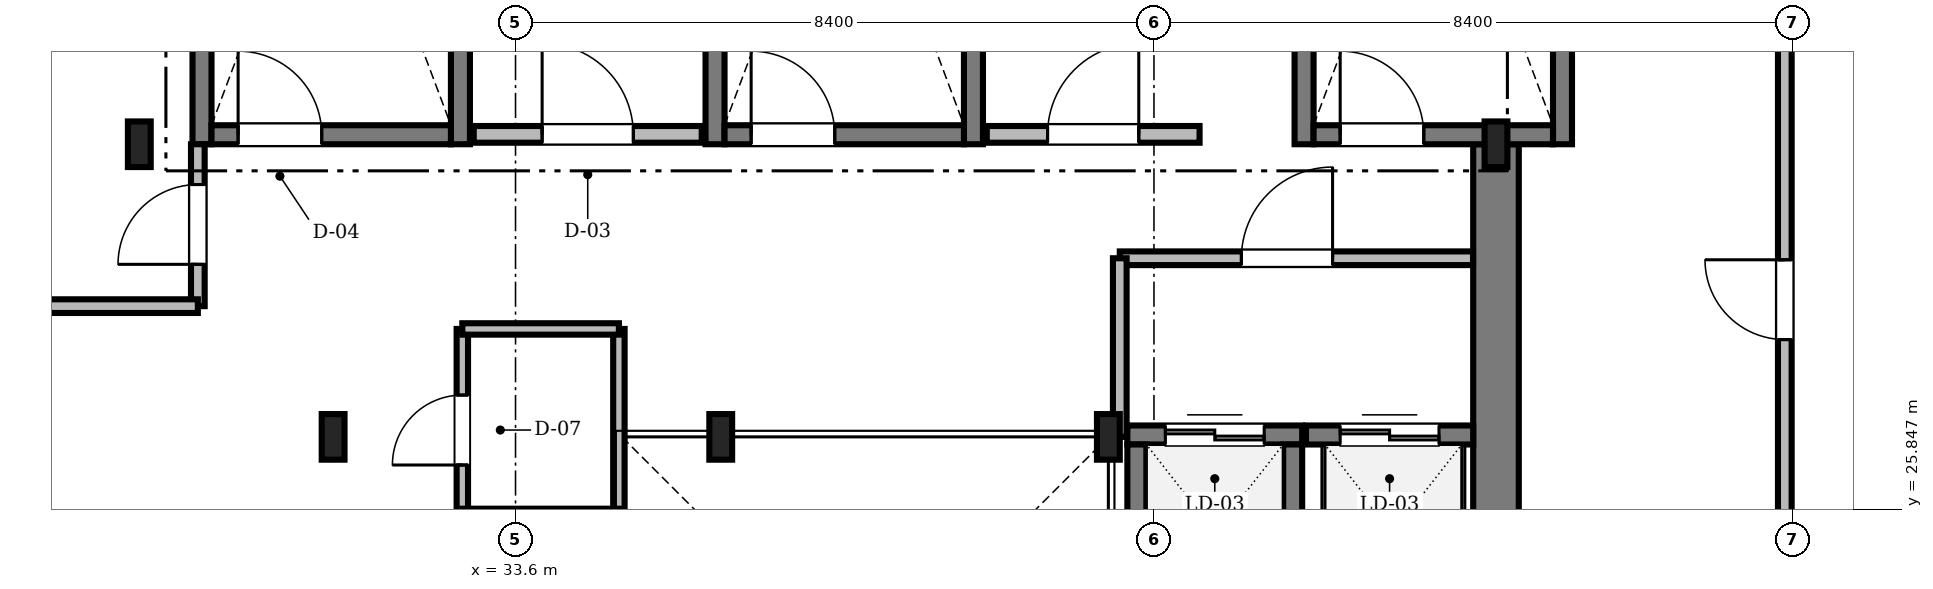
"""IFC4 building model, lengths in metres.
Left out: names, types, materials, properties, quantities, classifications, styles, units other than length and angle.
Written with IfcOpenShell. Run it as: python <this file> out.ifc"""

import sys

from ifc_helpers import new_model, si_unit, direction, frame, frame_2d, origin, origin_2d, place, context, subcontext, project, spatial, rectangle, i_section, extrude, source, transform, mapped, element, fill, save


model = new_model("IFC4")
c1 = context("Model", 3, precision=1e-05, world=origin(), true_north=direction((0.0, 1.0)))
c2 = subcontext(c1, "Body", "Model", "MODEL_VIEW")
j1 = project(units=[si_unit("LENGTHUNIT", "METRE"), si_unit("PLANEANGLEUNIT", "RADIAN")], contexts=[c1])
p1 = place(None, origin())
s1 = spatial("IfcSite", under=j1, at=p1, CompositionType="ELEMENT")
p2 = place(p1, origin())
s2 = spatial("IfcBuilding", under=s1, at=p2, CompositionType="ELEMENT")
p3 = place(p2, frame((0.0, 0.0, 291.15)))
s3 = spatial("IfcBuildingStorey", under=s2, at=p3, CompositionType="ELEMENT", Elevation=291.15)
m1 = source(origin(), c2, "Body", "SweptSolid", [
    extrude(rectangle(XDim=13.15, YDim=0.6, at=frame_2d((6.575, 0.0))), origin(), (0.0, 0.0, 1.0), 4.7),
])
p4 = place(p3, frame((46.5, 17.5, 0.0), z_axis=(0.0, 0.0, 1.0), x_axis=(0.0, 1.0, 0.0)))
e1 = element("IfcWall", 1, at=p4, inside=s3, PredefinedType="SHEAR", context=c2, shape_type="MappedRepresentation", body=[
    mapped(m1, transform((0.0, 0.0, 0.0), scale=1.0)),
])
m2 = source(origin(), c2, "Body", "SweptSolid", [
    extrude(i_section(OverallWidth=0.3, OverallDepth=0.6, WebThickness=0.015, FlangeThickness=0.03, FilletRadius=0.027, at=origin_2d()), origin(), (0.0, 0.0, 1.0), 4.7),
])
for number, where, z_axis, x_axis in (
    (2, (41.4, 26.8, 0.0), (0.0, 0.0, 1.0), (1.0, 0.0, 0.0)),
    (3, (36.3, 26.8, 0.0), (0.0, 0.0, 1.0), (1.0, 0.0, 0.0)),
    (4, (31.2, 26.8, 0.0), (0.0, 0.0, 1.0), (1.0, 0.0, 0.0)),
    (5, (28.65, 30.65, 0.0), (0.0, 0.0, 1.0), (1.0, 0.0, 0.0)),
    (6, (46.5, 30.65, 0.0), (0.0, 0.0, 1.0), (1.0, 0.0, 0.0)),
):
    element("IfcColumn", number, at=place(p3, frame(where, z_axis=z_axis, x_axis=x_axis)), inside=s3, PredefinedType="COLUMN", context=c2, shape_type="MappedRepresentation", body=[
        mapped(m2, transform((0.0, 0.0, 0.0), scale=1.0)),
    ])
m3 = source(origin(), c2, "Body", "SweptSolid", [
    extrude(rectangle(XDim=9.35, YDim=0.25, at=frame_2d((4.675, 0.0))), origin(), (0.0, 0.0, 1.0), 4.8),
])
for number, where, z_axis, x_axis in (
    (7, (29.475, 30.65, 0.0), (0.0, 0.0, 1.0), (0.0, 1.0, 0.0)),
    (8, (32.875, 30.65, 0.0), (0.0, 0.0, 1.0), (0.0, 1.0, 0.0)),
):
    element("IfcWall", number, at=place(p3, frame(where, z_axis=z_axis, x_axis=x_axis)), inside=s3, PredefinedType="SOLIDWALL", context=c2, shape_type="MappedRepresentation", body=[
        mapped(m3, transform((0.0, 0.0, 0.0), scale=1.0)),
    ])
m4 = source(origin(), c2, "Body", "SweptSolid", [
    extrude(rectangle(XDim=3.15, YDim=0.25, at=frame_2d((1.575, 0.0))), origin(), (0.0, 0.0, 1.0), 4.8),
])
p5 = place(p3, frame((29.6, 30.775, 0.0), z_axis=(0.0, 0.0, 1.0), x_axis=(1.0, 0.0, 0.0)))
e9 = element("IfcWall", 9, at=p5, inside=s3, PredefinedType="SOLIDWALL", context=c2, shape_type="MappedRepresentation", body=[
    mapped(m4, transform((0.0, 0.0, 0.0), scale=1.0)),
])
m5 = source(origin(), c2, "Body", "SweptSolid", [
    extrude(rectangle(XDim=1.1, YDim=2.2, at=frame_2d((0.55, 1.1))), frame((0.0, 0.135, 0.0), z_axis=(0.0, -1.0, 0.0), x_axis=(1.0, 0.0, 0.0)), (0.0, 0.0, 1.0), 0.27),
])
p6 = place(p5, frame((0.35, 0.0, 0.0)))
e10 = element("IfcOpeningElement", 10, at=p6, cuts=e9, PredefinedType="OPENING", context=c2, shape_type="MappedRepresentation", body=[
    mapped(m5, transform((0.0, 0.0, 0.0), scale=1.0)),
])
for number, where, z_axis, x_axis in (
    (11, (36.225, 30.65, 0.0), (0.0, 0.0, 1.0), (0.0, 1.0, 0.0)),
    (12, (39.625, 30.65, 0.0), (0.0, 0.0, 1.0), (0.0, 1.0, 0.0)),
):
    element("IfcWall", number, at=place(p3, frame(where, z_axis=z_axis, x_axis=x_axis)), inside=s3, PredefinedType="SOLIDWALL", context=c2, shape_type="MappedRepresentation", body=[
        mapped(m3, transform((0.0, 0.0, 0.0), scale=1.0)),
    ])
p7 = place(p3, frame((36.35, 30.775, 0.0), z_axis=(0.0, 0.0, 1.0), x_axis=(1.0, 0.0, 0.0)))
e13 = element("IfcWall", 13, at=p7, inside=s3, PredefinedType="SOLIDWALL", context=c2, shape_type="MappedRepresentation", body=[
    mapped(m4, transform((0.0, 0.0, 0.0), scale=1.0)),
])
p8 = place(p7, frame((0.35, 0.0, 0.0)))
e14 = element("IfcOpeningElement", 14, at=p8, cuts=e13, PredefinedType="OPENING", context=c2, shape_type="MappedRepresentation", body=[
    mapped(m5, transform((0.0, 0.0, 0.0), scale=1.0)),
])
for number, where, z_axis, x_axis in (
    (15, (43.975, 30.65, 0.0), (0.0, 0.0, 1.0), (0.0, 1.0, 0.0)),
    (16, (47.375, 30.65, 0.0), (0.0, 0.0, 1.0), (0.0, 1.0, 0.0)),
):
    element("IfcWall", number, at=place(p3, frame(where, z_axis=z_axis, x_axis=x_axis)), inside=s3, PredefinedType="SOLIDWALL", context=c2, shape_type="MappedRepresentation", body=[
        mapped(m3, transform((0.0, 0.0, 0.0), scale=1.0)),
    ])
p9 = place(p3, frame((44.1, 30.775, 0.0), z_axis=(0.0, 0.0, 1.0), x_axis=(1.0, 0.0, 0.0)))
e17 = element("IfcWall", 17, at=p9, inside=s3, PredefinedType="SOLIDWALL", context=c2, shape_type="MappedRepresentation", body=[
    mapped(m4, transform((0.0, 0.0, 0.0), scale=1.0)),
])
p10 = place(p9, frame((0.35, 0.0, 0.0)))
e18 = element("IfcOpeningElement", 18, at=p10, cuts=e17, PredefinedType="OPENING", context=c2, shape_type="MappedRepresentation", body=[
    mapped(m5, transform((0.0, 0.0, 0.0), scale=1.0)),
])
m6 = source(origin(), c2, "Body", "SweptSolid", [
    extrude(rectangle(XDim=3.0, YDim=0.22, at=frame_2d((1.5, 0.0))), origin(), (0.0, 0.0, 1.0), 4.7),
])
p11 = place(p3, frame((33.05, 30.78, 0.0), z_axis=(0.0, 0.0, 1.0), x_axis=(1.0, 0.0, 0.0)))
e19 = element("IfcWall", 19, at=p11, inside=s3, PredefinedType="SOLIDWALL", context=c2, shape_type="MappedRepresentation", body=[
    mapped(m6, transform((0.0, 0.0, 0.0), scale=1.0)),
])
m7 = source(origin(), c2, "Body", "SweptSolid", [
    extrude(rectangle(XDim=1.2, YDim=2.2, at=frame_2d((0.6, 1.1))), frame((0.0, 0.12, 0.0), z_axis=(0.0, -1.0, 0.0), x_axis=(1.0, 0.0, 0.0)), (0.0, 0.0, 1.0), 0.24),
])
p12 = place(p11, frame((0.9, 0.0, 0.0)))
e20 = element("IfcOpeningElement", 20, at=p12, cuts=e19, PredefinedType="OPENING", context=c2, shape_type="MappedRepresentation", body=[
    mapped(m7, transform((0.0, 0.0, 0.0), scale=1.0)),
])
m8 = source(origin(), c2, "Body", "SweptSolid", [
    extrude(rectangle(XDim=2.8, YDim=0.22, at=frame_2d((1.4, 0.0))), origin(), (0.0, 0.0, 1.0), 4.7),
])
p13 = place(p3, frame((39.8, 30.78, 0.0), z_axis=(0.0, 0.0, 1.0), x_axis=(1.0, 0.0, 0.0)))
e21 = element("IfcWall", 21, at=p13, inside=s3, PredefinedType="SOLIDWALL", context=c2, shape_type="MappedRepresentation", body=[
    mapped(m8, transform((0.0, 0.0, 0.0), scale=1.0)),
])
p14 = place(p13, frame((0.8, 0.0, 0.0)))
e22 = element("IfcOpeningElement", 22, at=p14, cuts=e21, PredefinedType="OPENING", context=c2, shape_type="MappedRepresentation", body=[
    mapped(m7, transform((0.0, 0.0, 0.0), scale=1.0)),
])
m9 = source(origin(), c2, "Body", "SweptSolid", [
    extrude(rectangle(XDim=2.3, YDim=0.25, at=frame_2d((1.15, 0.0))), origin(), (0.0, 0.0, 1.0), 4.7),
])
p15 = place(p3, frame((41.65, 26.825, 0.0), z_axis=(0.0, 0.0, 1.0), x_axis=(1.0, 0.0, 0.0)))
e23 = element("IfcWall", 23, at=p15, inside=s3, PredefinedType="SOLIDWALL", context=c2, shape_type="MappedRepresentation", body=[
    mapped(m9, transform((0.0, 0.0, 0.0), scale=1.0)),
])
m10 = source(origin(), c2, "Body", "SweptSolid", [
    extrude(rectangle(XDim=1.3, YDim=2.3, at=frame_2d((0.65, 1.15))), frame((0.0, 0.135, 0.0), z_axis=(0.0, -1.0, 0.0), x_axis=(1.0, 0.0, 0.0)), (0.0, 0.0, 1.0), 0.27),
])
p16 = place(p15, frame((0.5, 0.0, 0.0)))
e24 = element("IfcOpeningElement", 24, at=p16, cuts=e23, PredefinedType="OPENING", context=c2, shape_type="MappedRepresentation", body=[
    mapped(m10, transform((0.0, 0.0, 0.0), scale=1.0)),
])
for number, where, z_axis, x_axis in (
    (25, (41.775, 24.4, 0.0), (0.0, 0.0, 1.0), (0.0, 1.0, 0.0)),
    (26, (43.825, 24.4, 0.0), (0.0, 0.0, 1.0), (0.0, 1.0, 0.0)),
):
    element("IfcWall", number, at=place(p3, frame(where, z_axis=z_axis, x_axis=x_axis)), inside=s3, PredefinedType="SOLIDWALL", context=c2, shape_type="MappedRepresentation", body=[
        mapped(m9, transform((0.0, 0.0, 0.0), scale=1.0)),
    ])
m11 = source(origin(), c2, "Body", "SweptSolid", [
    extrude(rectangle(XDim=2.2, YDim=0.25, at=frame_2d((1.1, 0.0))), origin(), (0.0, 0.0, 1.0), 4.7),
])
p17 = place(p3, frame((44.0, 26.825, 0.0), z_axis=(0.0, 0.0, 1.0), x_axis=(1.0, 0.0, 0.0)))
e27 = element("IfcWall", 27, at=p17, inside=s3, PredefinedType="SOLIDWALL", context=c2, shape_type="MappedRepresentation", body=[
    mapped(m11, transform((0.0, 0.0, 0.0), scale=1.0)),
])
p18 = place(p17, frame((0.45, 0.0, 0.0)))
e28 = element("IfcOpeningElement", 28, at=p18, cuts=e27, PredefinedType="OPENING", context=c2, shape_type="MappedRepresentation", body=[
    mapped(m10, transform((0.0, 0.0, 0.0), scale=1.0)),
])
m12 = source(origin(), c2, "Body", "SweptSolid", [
    extrude(rectangle(XDim=26.968, YDim=0.18, at=frame_2d((13.484, 0.0))), origin(), (0.0, 0.0, 1.0), 3.942),
])
p19 = place(p3, frame((50.3, 16.45, 0.0), z_axis=(0.0, 0.0, 1.0), x_axis=(0.0, 1.0, 0.0)))
e29 = element("IfcWall", 29, at=p19, inside=s3, PredefinedType="PARTITIONING", context=c2, shape_type="MappedRepresentation", body=[
    mapped(m12, transform((0.0, 0.0, 0.0), scale=1.0)),
])
m13 = source(origin(), c2, "Body", "SweptSolid", [
    extrude(rectangle(XDim=1.05, YDim=2.2, at=frame_2d((0.525, 1.1))), frame((0.0, 0.1, 0.0), z_axis=(0.0, -1.0, 0.0), x_axis=(1.0, 0.0, 0.0)), (0.0, 0.0, 1.0), 0.2),
])
p20 = place(p19, frame((3.48, 0.0, 0.0)))
e30 = element("IfcOpeningElement", 30, at=p20, cuts=e29, PredefinedType="OPENING", context=c2, shape_type="MappedRepresentation", body=[
    mapped(m13, transform((0.0, 0.0, 0.0), scale=1.0)),
])
p21 = place(p19, frame((11.63, 0.0, 0.0)))
e31 = element("IfcOpeningElement", 31, at=p21, cuts=e29, PredefinedType="OPENING", context=c2, shape_type="MappedRepresentation", body=[
    mapped(m13, transform((0.0, 0.0, 0.0), scale=1.0)),
])
p22 = place(p19, frame((21.125, 0.0, 0.0)))
e32 = element("IfcOpeningElement", 32, at=p22, cuts=e29, PredefinedType="OPENING", context=c2, shape_type="MappedRepresentation", body=[
    mapped(m13, transform((0.0, 0.0, 0.0), scale=1.0)),
])
m14 = source(origin(), c2, "Body", "SweptSolid", [
    extrude(rectangle(XDim=2.13, YDim=0.18, at=frame_2d((1.065, 0.0))), origin(), (0.0, 0.0, 1.0), 4.332),
])
p23 = place(p3, frame((29.42, 28.52, 0.0), z_axis=(0.0, 0.0, 1.0), x_axis=(0.0, 1.0, 0.0)))
e33 = element("IfcWall", 33, at=p23, inside=s3, PredefinedType="PARTITIONING", context=c2, shape_type="MappedRepresentation", body=[
    mapped(m14, transform((0.0, 0.0, 0.0), scale=1.0)),
])
p24 = place(p23, frame((0.55, 0.0, 0.0)))
e34 = element("IfcOpeningElement", 34, at=p24, cuts=e33, PredefinedType="OPENING", context=c2, shape_type="MappedRepresentation", body=[
    mapped(m13, transform((0.0, 0.0, 0.0), scale=1.0)),
])
m15 = source(origin(), c2, "Body", "SweptSolid", [
    extrude(rectangle(XDim=4.648, YDim=0.18, at=frame_2d((2.324, 0.0))), origin(), (0.0, 0.0, 1.0), 4.332),
])
p25 = place(p3, frame((41.55, 29.15, 0.0), z_axis=(0.0, 0.0, 1.0), x_axis=(1.0, 0.0, 0.0)))
e35 = element("IfcWall", 35, at=p25, inside=s3, PredefinedType="PARTITIONING", context=c2, shape_type="MappedRepresentation", body=[
    mapped(m15, transform((0.0, 0.0, 0.0), scale=1.0)),
])
m16 = source(origin(), c2, "Body", "SweptSolid", [
    extrude(rectangle(XDim=1.2, YDim=2.2, at=frame_2d((0.6, 1.1))), frame((0.0, 0.1, 0.0), z_axis=(0.0, -1.0, 0.0), x_axis=(1.0, 0.0, 0.0)), (0.0, 0.0, 1.0), 0.2),
])
p26 = place(p25, frame((1.6, 0.0, 0.0)))
e36 = element("IfcOpeningElement", 36, at=p26, cuts=e35, PredefinedType="OPENING", context=c2, shape_type="MappedRepresentation", body=[
    mapped(m16, transform((0.0, 0.0, 0.0), scale=1.0)),
])
m17 = source(origin(), c2, "Body", "SweptSolid", [
    extrude(rectangle(XDim=2.44, YDim=0.15, at=frame_2d((1.22, 0.0))), origin(), (0.0, 0.0, 1.0), 4.242),
])
p27 = place(p3, frame((32.9, 25.78, 0.0), z_axis=(0.0, 0.0, 1.0), x_axis=(0.0, 1.0, 0.0)))
e37 = element("IfcWall", 37, at=p27, inside=s3, PredefinedType="PARTITIONING", context=c2, shape_type="MappedRepresentation", body=[
    mapped(m17, transform((0.0, 0.0, 0.0), scale=1.0)),
])
m18 = source(origin(), c2, "Body", "SweptSolid", [
    extrude(rectangle(XDim=0.92, YDim=2.1, at=frame_2d((0.46, 1.05))), frame((0.0, 0.085, 0.0), z_axis=(0.0, -1.0, 0.0), x_axis=(1.0, 0.0, 0.0)), (0.0, 0.0, 1.0), 0.17),
])
p28 = place(p27, frame((0.65, 0.0, 0.0)))
e38 = element("IfcOpeningElement", 38, at=p28, cuts=e37, PredefinedType="OPENING", context=c2, shape_type="MappedRepresentation", body=[
    mapped(m18, transform((0.0, 0.0, 0.0), scale=1.0)),
])
m19 = source(origin(), c2, "Body", "SweptSolid", [
    extrude(rectangle(XDim=4.138, YDim=0.18, at=frame_2d((2.069, 0.0))), origin(), (0.0, 0.0, 1.0), 3.942),
])
p29 = place(p3, frame((25.282, 28.52, 0.0), z_axis=(0.0, 0.0, 1.0), x_axis=(1.0, 0.0, 0.0)))
e39 = element("IfcWall", 39, at=p29, inside=s3, PredefinedType="PARTITIONING", context=c2, shape_type="MappedRepresentation", body=[
    mapped(m19, transform((0.0, 0.0, 0.0), scale=1.0)),
])
p30 = place(p3, frame((34.96, 25.78, 0.0), z_axis=(0.0, 0.0, 1.0), x_axis=(0.0, 1.0, 0.0)))
e40 = element("IfcWall", 40, at=p30, inside=s3, PredefinedType="PARTITIONING", context=c2, shape_type="MappedRepresentation", body=[
    mapped(m17, transform((0.0, 0.0, 0.0), scale=1.0)),
])
m20 = source(origin(), c2, "Body", "SweptSolid", [
    extrude(rectangle(XDim=2.35, YDim=0.18, at=frame_2d((1.175, 0.0))), origin(), (0.0, 0.0, 1.0), 4.332),
])
p31 = place(p3, frame((41.55, 26.8, 0.0), z_axis=(0.0, 0.0, 1.0), x_axis=(0.0, 1.0, 0.0)))
e41 = element("IfcWall", 41, at=p31, inside=s3, PredefinedType="PARTITIONING", context=c2, shape_type="MappedRepresentation", body=[
    mapped(m20, transform((0.0, 0.0, 0.0), scale=1.0)),
])
m21 = source(origin(), c2, "Body", "SweptSolid", [
    extrude(rectangle(XDim=2.06, YDim=0.15, at=frame_2d((1.03, 0.0))), origin(), (0.0, 0.0, 1.0), 4.7),
])
p32 = place(p3, frame((32.9, 25.78, 0.0), z_axis=(0.0, 0.0, 1.0), x_axis=(1.0, 0.0, 0.0)))
e42 = element("IfcWall", 42, at=p32, inside=s3, PredefinedType="PARTITIONING", context=c2, shape_type="MappedRepresentation", body=[
    mapped(m21, transform((0.0, 0.0, 0.0), scale=1.0)),
])
m22 = source(origin(), c2, "Body", "SweptSolid", [
    extrude(rectangle(XDim=2.06, YDim=0.15, at=frame_2d((1.03, 0.0))), origin(), (0.0, 0.0, 1.0), 4.332),
])
p33 = place(p3, frame((32.9, 28.22, 0.0), z_axis=(0.0, 0.0, 1.0), x_axis=(1.0, 0.0, 0.0)))
e43 = element("IfcWall", 43, at=p33, inside=s3, PredefinedType="PARTITIONING", context=c2, shape_type="MappedRepresentation", body=[
    mapped(m22, transform((0.0, 0.0, 0.0), scale=1.0)),
])
m23 = source(origin(), c2, "Body", "SweptSolid", [
    extrude(rectangle(XDim=1.1, YDim=2.2, at=frame_2d((0.55, 1.1))), frame((0.0, 0.025, 0.0), z_axis=(0.0, -1.0, 0.0), x_axis=(1.0, 0.0, 0.0)), (0.0, 0.0, 1.0), 0.05),
])
p34 = place(p6, origin())
e44 = element("IfcDoor", 44, at=p34, inside=s3, OperationType="SINGLE_SWING_LEFT", PredefinedType="DOOR", context=c2, shape_type="MappedRepresentation", body=[
    mapped(m23, transform((0.0, 0.0, 0.0), scale=1.0)),
])
fill(e10, e44)
p35 = place(p8, origin())
e45 = element("IfcDoor", 45, at=p35, inside=s3, OperationType="SINGLE_SWING_LEFT", PredefinedType="DOOR", context=c2, shape_type="MappedRepresentation", body=[
    mapped(m23, transform((0.0, 0.0, 0.0), scale=1.0)),
])
fill(e14, e45)
p36 = place(p10, origin())
e46 = element("IfcDoor", 46, at=p36, inside=s3, OperationType="SINGLE_SWING_LEFT", PredefinedType="DOOR", context=c2, shape_type="MappedRepresentation", body=[
    mapped(m23, transform((0.0, 0.0, 0.0), scale=1.0)),
])
fill(e18, e46)
m24 = source(origin(), c2, "Body", "SweptSolid", [
    extrude(rectangle(XDim=1.2, YDim=2.2, at=frame_2d((0.6, 1.1))), frame((0.0, 0.025, 0.0), z_axis=(0.0, -1.0, 0.0), x_axis=(1.0, 0.0, 0.0)), (0.0, 0.0, 1.0), 0.05),
])
p37 = place(p12, origin())
e47 = element("IfcDoor", 47, at=p37, inside=s3, OperationType="SINGLE_SWING_LEFT", PredefinedType="DOOR", context=c2, shape_type="MappedRepresentation", body=[
    mapped(m24, transform((0.0, 0.0, 0.0), scale=1.0)),
])
fill(e20, e47)
p38 = place(p14, origin())
e48 = element("IfcDoor", 48, at=p38, inside=s3, OperationType="SINGLE_SWING_RIGHT", PredefinedType="DOOR", context=c2, shape_type="MappedRepresentation", body=[
    mapped(m24, transform((0.0, 0.0, 0.0), scale=1.0)),
])
fill(e22, e48)
m25 = source(origin(), c2, "Body", "SweptSolid", [
    extrude(rectangle(XDim=1.3, YDim=2.3, at=frame_2d((0.65, 1.15))), frame((0.0, 0.025, 0.0), z_axis=(0.0, -1.0, 0.0), x_axis=(1.0, 0.0, 0.0)), (0.0, 0.0, 1.0), 0.05),
])
p39 = place(p16, origin())
e49 = element("IfcDoor", 49, at=p39, inside=s3, OperationType="DOUBLE_DOOR_SLIDING", PredefinedType="DOOR", context=c2, shape_type="MappedRepresentation", body=[
    mapped(m25, transform((0.0, 0.0, 0.0), scale=1.0)),
])
fill(e24, e49)
p40 = place(p18, origin())
e50 = element("IfcDoor", 50, at=p40, inside=s3, OperationType="DOUBLE_DOOR_SLIDING", PredefinedType="DOOR", context=c2, shape_type="MappedRepresentation", body=[
    mapped(m25, transform((0.0, 0.0, 0.0), scale=1.0)),
])
fill(e28, e50)
m26 = source(origin(), c2, "Body", "SweptSolid", [
    extrude(rectangle(XDim=1.05, YDim=2.2, at=frame_2d((0.525, 1.1))), frame((0.0, 0.025, 0.0), z_axis=(0.0, -1.0, 0.0), x_axis=(1.0, 0.0, 0.0)), (0.0, 0.0, 1.0), 0.05),
])
p41 = place(p21, origin())
e51 = element("IfcDoor", 51, at=p41, inside=s3, OperationType="SINGLE_SWING_RIGHT", PredefinedType="DOOR", context=c2, shape_type="MappedRepresentation", body=[
    mapped(m26, transform((0.0, 0.0, 0.0), scale=1.0)),
])
fill(e31, e51)
p42 = place(p24, origin())
e52 = element("IfcDoor", 52, at=p42, inside=s3, OperationType="SINGLE_SWING_LEFT", PredefinedType="DOOR", context=c2, shape_type="MappedRepresentation", body=[
    mapped(m26, transform((0.0, 0.0, 0.0), scale=1.0)),
])
fill(e34, e52)
p43 = place(p26, origin())
e53 = element("IfcDoor", 53, at=p43, inside=s3, OperationType="SINGLE_SWING_RIGHT", PredefinedType="DOOR", context=c2, shape_type="MappedRepresentation", body=[
    mapped(m24, transform((0.0, 0.0, 0.0), scale=1.0)),
])
fill(e36, e53)
m27 = source(origin(), c2, "Body", "SweptSolid", [
    extrude(rectangle(XDim=0.92, YDim=2.1, at=frame_2d((0.46, 1.05))), frame((0.0, 0.025, 0.0), z_axis=(0.0, -1.0, 0.0), x_axis=(1.0, 0.0, 0.0)), (0.0, 0.0, 1.0), 0.05),
])
p44 = place(p28, origin())
e54 = element("IfcDoor", 54, at=p44, inside=s3, OperationType="SINGLE_SWING_LEFT", PredefinedType="DOOR", context=c2, shape_type="MappedRepresentation", body=[
    mapped(m27, transform((0.0, 0.0, 0.0), scale=1.0)),
])
fill(e38, e54)
save(model, sys.argv[1])
